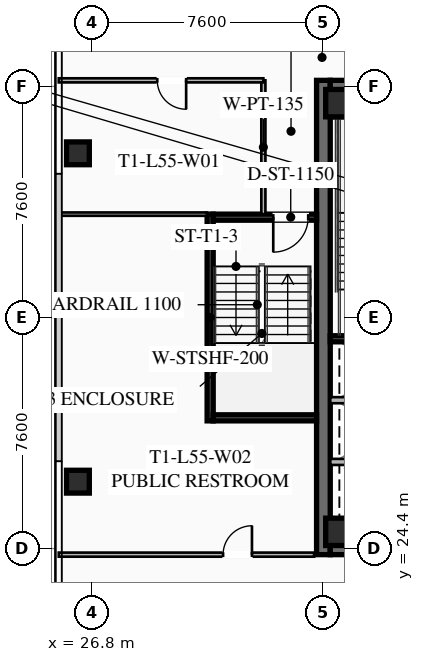
"""IFC4 building model, lengths in metres.
Left out: names, types, materials, properties, quantities, classifications, styles, units other than length and angle.
Written with IfcOpenShell. Run it as: python <this file> out.ifc"""

import sys

from ifc_helpers import new_model, si_unit, direction, frame, frame_2d, origin, origin_2d, place, context, subcontext, project, spatial, rectangle, hollow_rectangle, extrude, element, fill, save


model = new_model("IFC4")
c1 = context("Model", 3, precision=1e-05, world=origin(), true_north=direction((0.0, 1.0)))
c2 = subcontext(c1, "Body", "Model", "MODEL_VIEW")
j1 = project(units=[si_unit("LENGTHUNIT", "METRE"), si_unit("PLANEANGLEUNIT", "RADIAN")], contexts=[c1])
p1 = place(None, origin())
s1 = spatial("IfcSite", under=j1, at=p1, CompositionType="ELEMENT")
p2 = place(p1, origin())
s2 = spatial("IfcBuilding", under=s1, at=p2, CompositionType="ELEMENT")
p3 = place(p2, frame((0.0, 0.0, 204.2)))
s3 = spatial("IfcBuildingStorey", under=s2, at=p3, CompositionType="ELEMENT", Elevation=204.2)
p4 = place(p3, frame((34.425, 24.2, 0.0), z_axis=(0.0, 0.0, 1.0), x_axis=(0.0, 1.0, 0.0)))
e1 = element("IfcWall", 1, at=p4, inside=s3, PredefinedType="SHEAR", context=c2, shape_type="SweptSolid", body=[
    extrude(rectangle(XDim=15.6, YDim=0.45, at=frame_2d((7.8, 0.0))), origin(), (0.0, 0.0, 1.0), 3.55),
])
p5 = place(p3, frame((49.35, 24.425, 0.0), z_axis=(0.0, 0.0, 1.0), x_axis=(-1.0, 0.0, 0.0)))
e2 = element("IfcWall", 2, at=p5, inside=s3, PredefinedType="SHEAR", context=c2, shape_type="SweptSolid", body=[
    extrude(rectangle(XDim=14.7, YDim=0.45, at=frame_2d((7.35, 0.0))), origin(), (0.0, 0.0, 1.0), 3.55),
])
p6 = place(p5, frame((9.05, 0.0, 0.0)))
e3 = element("IfcOpeningElement", 3, at=p6, cuts=e2, PredefinedType="OPENING", context=c2, shape_type="SweptSolid", body=[
    extrude(rectangle(XDim=1.25, YDim=2.25, at=frame_2d((0.625, 1.125))), frame((0.0, 0.235, 0.0), z_axis=(0.0, -1.0, 0.0), x_axis=(1.0, 0.0, 0.0)), (0.0, 0.0, 1.0), 0.47),
])
p7 = place(p5, frame((4.0, 0.0, 0.0)))
e4 = element("IfcOpeningElement", 4, at=p7, cuts=e2, PredefinedType="OPENING", context=c2, shape_type="SweptSolid", body=[
    extrude(rectangle(XDim=1.25, YDim=2.25, at=frame_2d((0.625, 1.125))), frame((0.0, 0.235, 0.0), z_axis=(0.0, -1.0, 0.0), x_axis=(1.0, 0.0, 0.0)), (0.0, 0.0, 1.0), 0.47),
])
p8 = place(p3, frame((34.65, 39.575, 0.0), z_axis=(0.0, 0.0, 1.0), x_axis=(1.0, 0.0, 0.0)))
e5 = element("IfcWall", 5, at=p8, inside=s3, PredefinedType="SHEAR", context=c2, shape_type="SweptSolid", body=[
    extrude(rectangle(XDim=14.7, YDim=0.45, at=frame_2d((7.35, 0.0))), origin(), (0.0, 0.0, 1.0), 3.55),
])
p9 = place(p8, frame((4.4, 0.0, 0.0)))
e6 = element("IfcOpeningElement", 6, at=p9, cuts=e5, PredefinedType="OPENING", context=c2, shape_type="SweptSolid", body=[
    extrude(rectangle(XDim=1.25, YDim=2.25, at=frame_2d((0.625, 1.125))), frame((0.0, 0.235, 0.0), z_axis=(0.0, -1.0, 0.0), x_axis=(1.0, 0.0, 0.0)), (0.0, 0.0, 1.0), 0.47),
])
p10 = place(p8, frame((9.45, 0.0, 0.0)))
e7 = element("IfcOpeningElement", 7, at=p10, cuts=e5, PredefinedType="OPENING", context=c2, shape_type="SweptSolid", body=[
    extrude(rectangle(XDim=1.25, YDim=2.25, at=frame_2d((0.625, 1.125))), frame((0.0, 0.235, 0.0), z_axis=(0.0, -1.0, 0.0), x_axis=(1.0, 0.0, 0.0)), (0.0, 0.0, 1.0), 0.47),
])
for number, where, z_axis, x_axis in (
    (8, (34.95, 24.95, 0.0), (0.0, 0.0, 1.0), (1.0, 0.0, 0.0)),
    (9, (34.95, 39.05, 0.0), (0.0, 0.0, 1.0), (1.0, 0.0, 0.0)),
):
    element("IfcColumn", number, at=place(p3, frame(where, z_axis=z_axis, x_axis=x_axis)), inside=s3, PredefinedType="COLUMN", context=c2, shape_type="SweptSolid", body=[
        extrude(hollow_rectangle(XDim=0.9, YDim=0.9, WallThickness=0.04, at=origin_2d()), origin(), (0.0, 0.0, 1.0), 3.37),
    ])
for number, where, z_axis, x_axis in (
    (10, (26.35, 37.4, 0.0), (0.0, 0.0, 1.0), (1.0, 0.0, 0.0)),
    (11, (26.35, 26.6, 0.0), (0.0, 0.0, 1.0), (1.0, 0.0, 0.0)),
):
    element("IfcColumn", number, at=place(p3, frame(where, z_axis=z_axis, x_axis=x_axis)), inside=s3, PredefinedType="COLUMN", context=c2, shape_type="SweptSolid", body=[
        extrude(hollow_rectangle(XDim=0.75, YDim=0.75, WallThickness=0.032, at=origin_2d()), origin(), (0.0, 0.0, 1.0), 3.37),
    ])
for number, where, z_axis, x_axis in (
    (12, (34.65, 31.3, 0.0), (0.0, 0.0, 1.0), (1.0, 0.0, 0.0)),
    (13, (34.65, 38.7, 0.0), (0.0, 0.0, 1.0), (1.0, 0.0, 0.0)),
):
    element("IfcWall", number, at=place(p3, frame(where, z_axis=z_axis, x_axis=x_axis)), inside=s3, PredefinedType="SHEAR", context=c2, shape_type="SweptSolid", body=[
        extrude(rectangle(XDim=3.65, YDim=0.2, at=frame_2d((1.825, 0.0))), origin(), (0.0, 0.0, 1.0), 3.37),
    ])
for number, where, z_axis, x_axis in (
    (14, (34.65, 27.25, 0.0), (0.0, 0.0, 1.0), (1.0, 0.0, 0.0)),
    (15, (34.65, 29.28, 0.0), (0.0, 0.0, 1.0), (1.0, 0.0, 0.0)),
):
    element("IfcWall", number, at=place(p3, frame(where, z_axis=z_axis, x_axis=x_axis)), inside=s3, PredefinedType="SOLIDWALL", context=c2, shape_type="SweptSolid", body=[
        extrude(rectangle(XDim=3.3, YDim=0.2, at=frame_2d((1.65, 0.0))), origin(), (0.0, 0.0, 1.0), 3.37),
    ])
p11 = place(p3, frame((30.7, 28.6, 0.0), z_axis=(0.0, 0.0, 1.0), x_axis=(0.0, 1.0, 0.0)))
e16 = element("IfcWall", 16, at=p11, inside=s3, PredefinedType="SHEAR", context=c2, shape_type="SweptSolid", body=[
    extrude(rectangle(XDim=6.8, YDim=0.2, at=frame_2d((3.4, 0.0))), origin(), (0.0, 0.0, 1.0), 3.37),
])
p12 = place(p3, frame((34.2, 35.3, 0.0), z_axis=(0.0, 0.0, 1.0), x_axis=(-1.0, 0.0, 0.0)))
e17 = element("IfcWall", 17, at=p12, inside=s3, PredefinedType="SHEAR", context=c2, shape_type="SweptSolid", body=[
    extrude(rectangle(XDim=3.4, YDim=0.2, at=frame_2d((1.7, 0.0))), origin(), (0.0, 0.0, 1.0), 3.37),
])
p13 = place(p12, frame((0.275, 0.0, 0.0)))
e18 = element("IfcOpeningElement", 18, at=p13, cuts=e17, PredefinedType="OPENING", context=c2, shape_type="SweptSolid", body=[
    extrude(rectangle(XDim=1.15, YDim=2.2, at=frame_2d((0.575, 1.1))), frame((0.0, 0.11, 0.0), z_axis=(0.0, -1.0, 0.0), x_axis=(1.0, 0.0, 0.0)), (0.0, 0.0, 1.0), 0.22),
])
p14 = place(p3, frame((30.8, 28.7, 0.0), z_axis=(0.0, 0.0, 1.0), x_axis=(1.0, 0.0, 0.0)))
e19 = element("IfcWall", 19, at=p14, inside=s3, PredefinedType="SHEAR", context=c2, shape_type="SweptSolid", body=[
    extrude(rectangle(XDim=3.4, YDim=0.2, at=frame_2d((1.7, 0.0))), origin(), (0.0, 0.0, 1.0), 3.37),
])
p15 = place(p3, frame((32.45, 35.4, 0.0), z_axis=(0.0, 0.0, 1.0), x_axis=(0.0, 1.0, 0.0)))
e20 = element("IfcWall", 20, at=p15, inside=s3, PredefinedType="PARTITIONING", context=c2, shape_type="SweptSolid", body=[
    extrude(rectangle(XDim=4.4, YDim=0.135, at=frame_2d((2.2, 0.0))), origin(), (0.0, 0.0, 1.0), 2.723),
])
p16 = place(p3, frame((32.45, 39.8, 0.0), z_axis=(0.0, 0.0, 1.0), x_axis=(-1.0, 0.0, 0.0)))
e21 = element("IfcWall", 21, at=p16, inside=s3, PredefinedType="PARTITIONING", context=c2, shape_type="SweptSolid", body=[
    extrude(rectangle(XDim=6.73, YDim=0.135, at=frame_2d((3.365, 0.0))), origin(), (0.0, 0.0, 1.0), 2.723),
])
p17 = place(p16, frame((2.54, 0.0, 0.0)))
e22 = element("IfcOpeningElement", 22, at=p17, cuts=e21, PredefinedType="OPENING", context=c2, shape_type="SweptSolid", body=[
    extrude(rectangle(XDim=0.95, YDim=2.05, at=frame_2d((0.475, 1.025))), frame((0.0, 0.077, 0.0), z_axis=(0.0, -1.0, 0.0), x_axis=(1.0, 0.0, 0.0)), (0.0, 0.0, 1.0), 0.155),
])
p18 = place(p3, frame((25.72, 24.2, 0.0), z_axis=(0.0, 0.0, 1.0), x_axis=(1.0, 0.0, 0.0)))
e23 = element("IfcWall", 23, at=p18, inside=s3, PredefinedType="PARTITIONING", context=c2, shape_type="SweptSolid", body=[
    extrude(rectangle(XDim=8.4, YDim=0.135, at=frame_2d((4.2, 0.0))), origin(), (0.0, 0.0, 1.0), 2.723),
])
p19 = place(p18, frame((5.405, 0.0, 0.0)))
e24 = element("IfcOpeningElement", 24, at=p19, cuts=e23, PredefinedType="OPENING", context=c2, shape_type="SweptSolid", body=[
    extrude(rectangle(XDim=0.95, YDim=2.05, at=frame_2d((0.475, 1.025))), frame((0.0, 0.077, 0.0), z_axis=(0.0, -1.0, 0.0), x_axis=(1.0, 0.0, 0.0)), (0.0, 0.0, 1.0), 0.155),
])
p20 = place(p3, frame((30.6, 35.4, 0.0), z_axis=(0.0, 0.0, 1.0), x_axis=(-1.0, 0.0, 0.0)))
e25 = element("IfcWall", 25, at=p20, inside=s3, PredefinedType="PARTITIONING", context=c2, shape_type="SweptSolid", body=[
    extrude(rectangle(XDim=4.88, YDim=0.11, at=frame_2d((2.44, 0.0))), origin(), (0.0, 0.0, 1.0), 2.723),
])
p21 = place(p13, origin())
e26 = element("IfcDoor", 26, at=p21, inside=s3, OperationType="SINGLE_SWING_RIGHT", PredefinedType="DOOR", context=c2, shape_type="SweptSolid", body=[
    extrude(rectangle(XDim=1.15, YDim=2.2, at=frame_2d((0.575, 1.1))), frame((0.0, 0.025, 0.0), z_axis=(0.0, -1.0, 0.0), x_axis=(1.0, 0.0, 0.0)), (0.0, 0.0, 1.0), 0.05),
])
fill(e18, e26)
p22 = place(p17, origin())
e27 = element("IfcDoor", 27, at=p22, inside=s3, OperationType="SINGLE_SWING_LEFT", PredefinedType="DOOR", context=c2, shape_type="SweptSolid", body=[
    extrude(rectangle(XDim=0.95, YDim=2.05, at=frame_2d((0.475, 1.025))), frame((0.0, 0.025, 0.0), z_axis=(0.0, -1.0, 0.0), x_axis=(1.0, 0.0, 0.0)), (0.0, 0.0, 1.0), 0.05),
])
fill(e22, e27)
p23 = place(p19, origin())
e28 = element("IfcDoor", 28, at=p23, inside=s3, OperationType="SINGLE_SWING_RIGHT", PredefinedType="DOOR", context=c2, shape_type="SweptSolid", body=[
    extrude(rectangle(XDim=0.95, YDim=2.05, at=frame_2d((0.475, 1.025))), frame((0.0, 0.025, 0.0), z_axis=(0.0, -1.0, 0.0), x_axis=(1.0, 0.0, 0.0)), (0.0, 0.0, 1.0), 0.05),
])
fill(e24, e28)
save(model, sys.argv[1])
